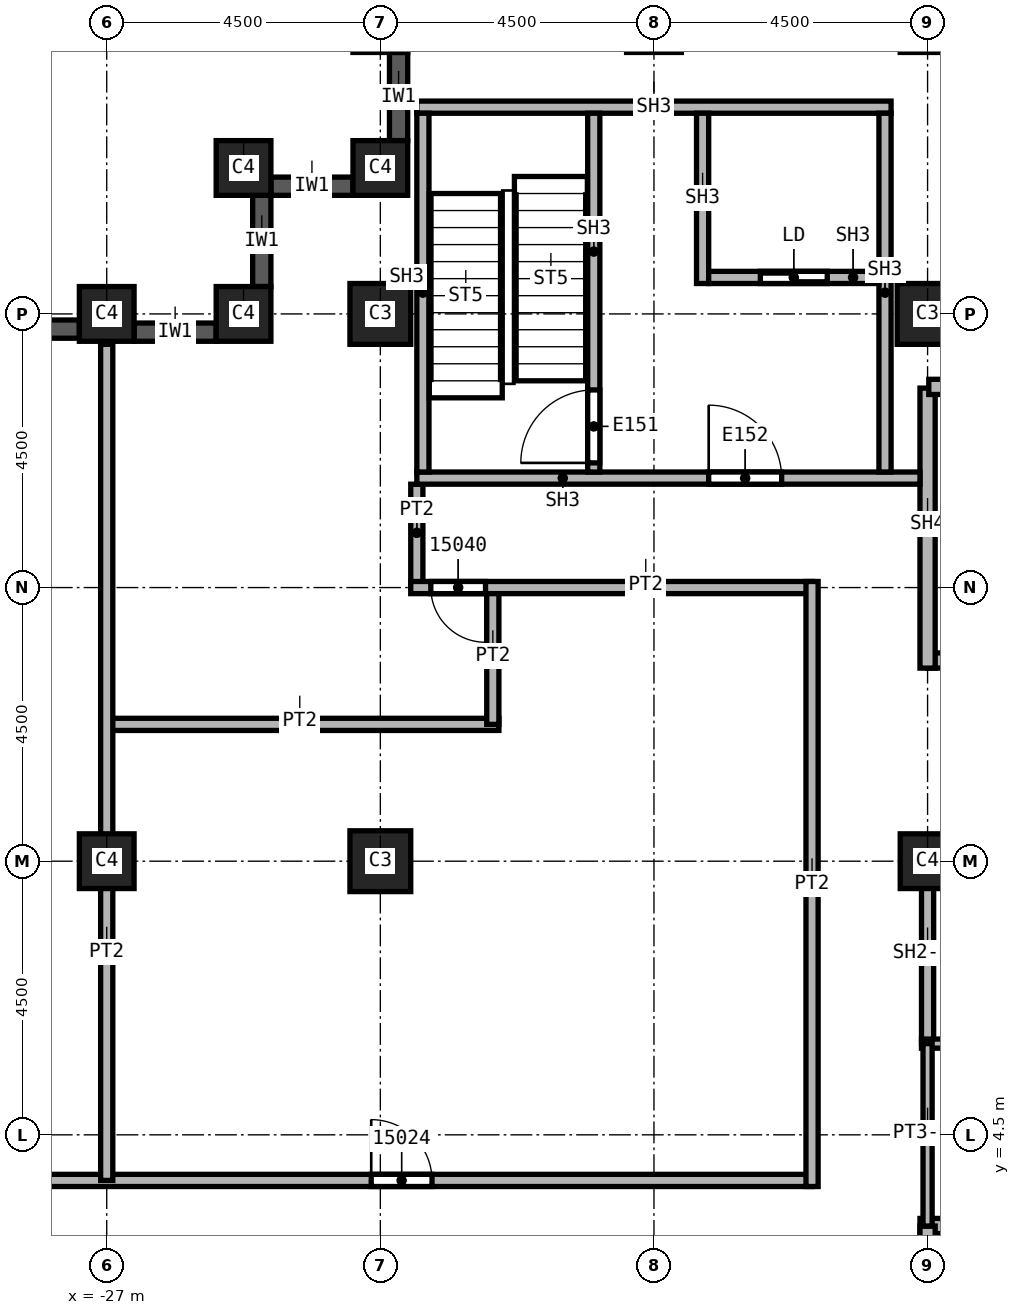
"""IFC4 building model, lengths in metres.
Left out: names, types, materials, properties, quantities, classifications, styles, units other than length and angle.
Written with IfcOpenShell. Run it as: python <this file> out.ifc"""

import sys

from ifc_helpers import new_model, si_unit, direction, frame, frame_2d, origin, origin_2d, place, context, subcontext, project, spatial, rectangle, extrude, element, fill, save


model = new_model("IFC4")
c1 = context("Model", 3, precision=1e-05, world=origin(), true_north=direction((0.0, 1.0)))
c2 = subcontext(c1, "Body", "Model", "MODEL_VIEW")
j1 = project(units=[si_unit("LENGTHUNIT", "METRE"), si_unit("PLANEANGLEUNIT", "RADIAN")], contexts=[c1])
p1 = place(None, origin())
s1 = spatial("IfcSite", under=j1, at=p1, CompositionType="ELEMENT")
p2 = place(p1, origin())
s2 = spatial("IfcBuilding", under=s1, at=p2, CompositionType="ELEMENT")
p3 = place(p2, frame((0.0, 0.0, 228.0)))
s3 = spatial("IfcBuildingStorey", under=s2, at=p3, CompositionType="ELEMENT", Elevation=228.0)
for number, where, z_axis, x_axis in (
    (1, (-13.5, 18.0, 0.0), (0.0, 0.0, 1.0), (1.0, 0.0, 0.0)),
    (2, (-22.5, 9.0, 0.0), (0.0, 0.0, 1.0), (1.0, 0.0, 0.0)),
    (3, (-22.5, 18.0, 0.0), (0.0, 0.0, 1.0), (1.0, 0.0, 0.0)),
):
    element("IfcColumn", number, at=place(p3, frame(where, z_axis=z_axis, x_axis=x_axis)), inside=s3, PredefinedType="COLUMN", context=c2, shape_type="SweptSolid", body=[
        extrude(rectangle(XDim=1.0, YDim=1.0, at=origin_2d()), origin(), (0.0, 0.0, 1.0), 3.72),
    ])
for number, where, z_axis, x_axis in (
    (4, (-13.5, 9.0, 0.0), (0.0, 0.0, 1.0), (1.0, 0.0, 0.0)),
    (5, (-27.0, 9.0, 0.0), (0.0, 0.0, 1.0), (1.0, 0.0, 0.0)),
    (6, (-27.0, 18.0, 0.0), (0.0, 0.0, 1.0), (1.0, 0.0, 0.0)),
    (7, (-22.5, 20.4, 0.0), (0.0, 0.0, 1.0), (1.0, 0.0, 0.0)),
    (8, (-24.75, 20.4, 0.0), (0.0, 0.0, 1.0), (1.0, 0.0, 0.0)),
    (9, (-24.75, 18.0, 0.0), (0.0, 0.0, 1.0), (1.0, 0.0, 0.0)),
):
    element("IfcColumn", number, at=place(p3, frame(where, z_axis=z_axis, x_axis=x_axis)), inside=s3, PredefinedType="COLUMN", context=c2, shape_type="SweptSolid", body=[
        extrude(rectangle(XDim=0.9, YDim=0.9, at=origin_2d()), origin(), (0.0, 0.0, 1.0), 3.72),
    ])
p4 = place(p3, frame((-22.95, 20.1, 0.0), z_axis=(0.0, 0.0, 1.0), x_axis=(-1.0, 0.0, 0.0)))
e10 = element("IfcWall", 10, at=p4, inside=s3, PredefinedType="SOLIDWALL", context=c2, shape_type="SweptSolid", body=[
    extrude(rectangle(XDim=1.35, YDim=0.3, at=frame_2d((0.675, 0.0))), origin(), (0.0, 0.0, 1.0), 3.12),
])
p5 = place(p3, frame((-24.45, 19.95, 0.0), z_axis=(0.0, 0.0, 1.0), x_axis=(0.0, -1.0, 0.0)))
e11 = element("IfcWall", 11, at=p5, inside=s3, PredefinedType="SOLIDWALL", context=c2, shape_type="SweptSolid", body=[
    extrude(rectangle(XDim=1.5, YDim=0.3, at=frame_2d((0.75, 0.0))), origin(), (0.0, 0.0, 1.0), 3.12),
])
p6 = place(p3, frame((-25.2, 17.7, 0.0), z_axis=(0.0, 0.0, 1.0), x_axis=(-1.0, 0.0, 0.0)))
e12 = element("IfcWall", 12, at=p6, inside=s3, PredefinedType="SOLIDWALL", context=c2, shape_type="SweptSolid", body=[
    extrude(rectangle(XDim=1.35, YDim=0.3, at=frame_2d((0.675, 0.0))), origin(), (0.0, 0.0, 1.0), 3.12),
])
p7 = place(p3, frame((-27.45, 17.75, 0.0), z_axis=(0.0, 0.0, 1.0), x_axis=(-1.0, 0.0, 0.0)))
e13 = element("IfcWall", 13, at=p7, inside=s3, PredefinedType="SOLIDWALL", context=c2, shape_type="SweptSolid", body=[
    extrude(rectangle(XDim=3.6, YDim=0.3, at=frame_2d((1.8, 0.0))), origin(), (0.0, 0.0, 1.0), 3.12),
])
p8 = place(p7, frame((0.6, 0.0, 0.8)))
e14 = element("IfcOpeningElement", 14, at=p8, cuts=e13, PredefinedType="OPENING", context=c2, shape_type="SweptSolid", body=[
    extrude(rectangle(XDim=2.4, YDim=1.95, at=frame_2d((1.2, 0.975))), frame((0.0, 0.15, 0.0), z_axis=(0.0, -1.0, 0.0), x_axis=(1.0, 0.0, 0.0)), (0.0, 0.0, 1.0), 0.3),
])
p9 = place(p3, frame((-22.2, 22.3, 0.0), z_axis=(0.0, 0.0, 1.0), x_axis=(0.0, -1.0, 0.0)))
e15 = element("IfcWall", 15, at=p9, inside=s3, PredefinedType="SOLIDWALL", context=c2, shape_type="SweptSolid", body=[
    extrude(rectangle(XDim=1.45, YDim=0.3, at=frame_2d((0.725, 0.0))), origin(), (0.0, 0.0, 1.0), 3.12),
])
p10 = place(p3, frame((-33.85, 3.75, 0.0), z_axis=(0.0, 0.0, 1.0), x_axis=(1.0, 0.0, 0.0)))
e16 = element("IfcWall", 16, at=p10, inside=s3, PredefinedType="PARTITIONING", context=c2, shape_type="SweptSolid", body=[
    extrude(rectangle(XDim=18.45, YDim=0.2, at=frame_2d((9.225, 0.0))), origin(), (0.0, 0.0, 1.0), 3.72),
])
p11 = place(p10, frame((11.2, 0.0, 0.0)))
e17 = element("IfcOpeningElement", 17, at=p11, cuts=e16, PredefinedType="OPENING", context=c2, shape_type="SweptSolid", body=[
    extrude(rectangle(XDim=1.0, YDim=2.1, at=frame_2d((0.5, 1.05))), frame((0.0, 0.1, 0.0), z_axis=(0.0, -1.0, 0.0), x_axis=(1.0, 0.0, 0.0)), (0.0, 0.0, 1.0), 0.2),
])
p12 = place(p3, frame((-27.1, 11.25, 0.0), z_axis=(0.0, 0.0, 1.0), x_axis=(1.0, 0.0, 0.0)))
e18 = element("IfcWall", 18, at=p12, inside=s3, PredefinedType="PARTITIONING", context=c2, shape_type="SweptSolid", body=[
    extrude(rectangle(XDim=6.55, YDim=0.2, at=frame_2d((3.275, 0.0))), origin(), (0.0, 0.0, 1.0), 3.72),
])
p13 = place(p3, frame((-27.0, 3.75, 0.0), z_axis=(0.0, 0.0, 1.0), x_axis=(0.0, 1.0, 0.0)))
e19 = element("IfcWall", 19, at=p13, inside=s3, PredefinedType="PARTITIONING", context=c2, shape_type="SweptSolid", body=[
    extrude(rectangle(XDim=13.75, YDim=0.2, at=frame_2d((6.875, 0.0))), origin(), (0.0, 0.0, 1.0), 3.72),
])
p14 = place(p3, frame((-21.9, 13.5, 0.0), z_axis=(0.0, 0.0, 1.0), x_axis=(0.0, 1.0, 0.0)))
e20 = element("IfcWall", 20, at=p14, inside=s3, PredefinedType="PARTITIONING", context=c2, shape_type="SweptSolid", body=[
    extrude(rectangle(XDim=1.7, YDim=0.2, at=frame_2d((0.85, 0.0))), origin(), (0.0, 0.0, 1.0), 3.72),
])
p15 = place(p3, frame((-20.65, 11.25, 0.0), z_axis=(0.0, 0.0, 1.0), x_axis=(0.0, 1.0, 0.0)))
e21 = element("IfcWall", 21, at=p15, inside=s3, PredefinedType="PARTITIONING", context=c2, shape_type="SweptSolid", body=[
    extrude(rectangle(XDim=2.25, YDim=0.2, at=frame_2d((1.125, 0.0))), origin(), (0.0, 0.0, 1.0), 3.72),
])
p16 = place(p3, frame((-15.4, 13.5, 0.0), z_axis=(0.0, 0.0, 1.0), x_axis=(-1.0, 0.0, 0.0)))
e22 = element("IfcWall", 22, at=p16, inside=s3, PredefinedType="PARTITIONING", context=c2, shape_type="SweptSolid", body=[
    extrude(rectangle(XDim=6.6, YDim=0.2, at=frame_2d((3.3, 0.0))), origin(), (0.0, 0.0, 1.0), 3.72),
])
p17 = place(p16, frame((5.37, 0.0, 0.0)))
e23 = element("IfcOpeningElement", 23, at=p17, cuts=e22, PredefinedType="OPENING", context=c2, shape_type="SweptSolid", body=[
    extrude(rectangle(XDim=0.9, YDim=2.1, at=frame_2d((0.45, 1.05))), frame((0.0, 0.1, 0.0), z_axis=(0.0, -1.0, 0.0), x_axis=(1.0, 0.0, 0.0)), (0.0, 0.0, 1.0), 0.2),
])
p18 = place(p3, frame((-15.4, 3.65, 0.0), z_axis=(0.0, 0.0, 1.0), x_axis=(0.0, 1.0, 0.0)))
e24 = element("IfcWall", 24, at=p18, inside=s3, PredefinedType="PARTITIONING", context=c2, shape_type="SweptSolid", body=[
    extrude(rectangle(XDim=9.95, YDim=0.2, at=frame_2d((4.975, 0.0))), origin(), (0.0, 0.0, 1.0), 3.72),
])
p19 = place(p3, frame((-13.5, 6.0, 0.0), z_axis=(0.0, 0.0, 1.0), x_axis=(0.0, 1.0, 0.0)))
e25 = element("IfcWall", 25, at=p19, inside=s3, PredefinedType="SOLIDWALL", context=c2, shape_type="SweptSolid", body=[
    extrude(rectangle(XDim=3.1, YDim=0.2, at=frame_2d((1.55, 0.0))), origin(), (0.0, 0.0, 1.0), 2.958),
])
p20 = place(p3, frame((-13.5, 9.0, 0.0), z_axis=(0.0, 0.0, 1.0), x_axis=(1.0, 0.0, 0.0)))
e26 = element("IfcWall", 26, at=p20, inside=s3, PredefinedType="SOLIDWALL", context=c2, shape_type="SweptSolid", body=[
    extrude(rectangle(XDim=3.0, YDim=0.2, at=frame_2d((1.5, 0.0))), origin(), (0.0, 0.0, 1.0), 2.958),
])
p21 = place(p3, frame((-13.625, 3.0, 0.0), z_axis=(0.0, 0.0, 1.0), x_axis=(1.0, 0.0, 0.0)))
e27 = element("IfcWall", 27, at=p21, inside=s3, PredefinedType="SOLIDWALL", context=c2, shape_type="SweptSolid", body=[
    extrude(rectangle(XDim=9.25, YDim=0.25, at=frame_2d((4.625, 0.0))), origin(), (0.0, 0.0, 1.0), 3.72),
])
p22 = place(p21, frame((3.25, 0.0, 0.0)))
e28 = element("IfcOpeningElement", 28, at=p22, cuts=e27, PredefinedType="OPENING", context=c2, shape_type="SweptSolid", body=[
    extrude(rectangle(XDim=1.1, YDim=2.1, at=frame_2d((0.55, 1.05))), frame((0.0, 0.125, 0.0), z_axis=(0.0, -1.0, 0.0), x_axis=(1.0, 0.0, 0.0)), (0.0, 0.0, 1.0), 0.25),
])
p23 = place(p3, frame((-13.5, -3.0, 0.0), z_axis=(0.0, 0.0, 1.0), x_axis=(0.0, 1.0, 0.0)))
e29 = element("IfcWall", 29, at=p23, inside=s3, PredefinedType="SOLIDWALL", context=c2, shape_type="SweptSolid", body=[
    extrude(rectangle(XDim=6.0, YDim=0.25, at=frame_2d((3.0, 0.0))), origin(), (0.0, 0.0, 1.0), 2.958),
])
p24 = place(p3, frame((-13.5, 12.3, 0.0), z_axis=(0.0, 0.0, 1.0), x_axis=(1.0, 0.0, 0.0)))
e30 = element("IfcWall", 30, at=p24, inside=s3, PredefinedType="SOLIDWALL", context=c2, shape_type="SweptSolid", body=[
    extrude(rectangle(XDim=9.125, YDim=0.25, at=frame_2d((4.562, 0.0))), origin(), (0.0, 0.0, 1.0), 3.72),
])
p25 = place(p24, frame((0.6, 0.0, 0.0)))
e31 = element("IfcOpeningElement", 31, at=p25, cuts=e30, PredefinedType="OPENING", context=c2, shape_type="SweptSolid", body=[
    extrude(rectangle(XDim=1.2, YDim=2.1, at=frame_2d((0.6, 1.05))), frame((0.0, 0.125, 0.0), z_axis=(0.0, -1.0, 0.0), x_axis=(1.0, 0.0, 0.0)), (0.0, 0.0, 1.0), 0.25),
])
p26 = place(p3, frame((-13.5, 16.78, 0.0), z_axis=(0.0, 0.0, 1.0), x_axis=(0.0, -1.0, 0.0)))
e32 = element("IfcWall", 32, at=p26, inside=s3, PredefinedType="SOLIDWALL", context=c2, shape_type="SweptSolid", body=[
    extrude(rectangle(XDim=4.605, YDim=0.25, at=frame_2d((2.302, 0.0))), origin(), (0.0, 0.0, 1.0), 3.72),
])
p27 = place(p3, frame((-13.48, 16.8, 0.0), z_axis=(0.0, 0.0, 1.0), x_axis=(1.0, 0.0, 0.0)))
e33 = element("IfcWall", 33, at=p27, inside=s3, PredefinedType="SOLIDWALL", context=c2, shape_type="SweptSolid", body=[
    extrude(rectangle(XDim=8.96, YDim=0.25, at=frame_2d((4.48, 0.0))), origin(), (0.0, 0.0, 1.0), 3.72),
])
p28 = place(p3, frame((-13.6, 6.0, 0.0), z_axis=(0.0, 0.0, 1.0), x_axis=(1.0, 0.0, 0.0)))
e34 = element("IfcWall", 34, at=p28, inside=s3, PredefinedType="PARTITIONING", context=c2, shape_type="SweptSolid", body=[
    extrude(rectangle(XDim=3.1, YDim=0.15, at=frame_2d((1.55, 0.0))), origin(), (0.0, 0.0, 1.0), 3.72),
])
p29 = place(p3, frame((-13.5, 3.0, 0.0), z_axis=(0.0, 0.0, 1.0), x_axis=(0.0, 1.0, 0.0)))
e35 = element("IfcWall", 35, at=p29, inside=s3, PredefinedType="PARTITIONING", context=c2, shape_type="SweptSolid", body=[
    extrude(rectangle(XDim=3.0, YDim=0.15, at=frame_2d((1.5, 0.0))), origin(), (0.0, 0.0, 1.0), 2.958),
])
p30 = place(p3, frame((-21.9, 15.3, 0.0), z_axis=(0.0, 0.0, 1.0), x_axis=(1.0, 0.0, 0.0)))
e36 = element("IfcWall", 36, at=p30, inside=s3, PredefinedType="SOLIDWALL", context=c2, shape_type="SweptSolid", body=[
    extrude(rectangle(XDim=8.275, YDim=0.2, at=frame_2d((4.137, 0.0))), origin(), (0.0, 0.0, 1.0), 3.72),
])
p31 = place(p30, frame((4.8, 0.0, 0.0)))
e37 = element("IfcOpeningElement", 37, at=p31, cuts=e36, PredefinedType="OPENING", context=c2, shape_type="SweptSolid", body=[
    extrude(rectangle(XDim=1.2, YDim=2.1, at=frame_2d((0.6, 1.05))), frame((0.0, 0.1, 0.0), z_axis=(0.0, -1.0, 0.0), x_axis=(1.0, 0.0, 0.0)), (0.0, 0.0, 1.0), 0.2),
])
p32 = place(p3, frame((-21.9, 21.4, 0.0), z_axis=(0.0, 0.0, 1.0), x_axis=(1.0, 0.0, 0.0)))
e38 = element("IfcWall", 38, at=p32, inside=s3, PredefinedType="SOLIDWALL", context=c2, shape_type="SweptSolid", body=[
    extrude(rectangle(XDim=7.8, YDim=0.2, at=frame_2d((3.9, 0.0))), origin(), (0.0, 0.0, 1.0), 3.72),
])
for number, where, z_axis, x_axis in (
    (39, (-21.8, 15.4, 0.0), (0.0, 0.0, 1.0), (0.0, 1.0, 0.0)),
    (40, (-14.2, 15.4, 0.0), (0.0, 0.0, 1.0), (0.0, 1.0, 0.0)),
):
    element("IfcWall", number, at=place(p3, frame(where, z_axis=z_axis, x_axis=x_axis)), inside=s3, PredefinedType="SOLIDWALL", context=c2, shape_type="SweptSolid", body=[
        extrude(rectangle(XDim=5.9, YDim=0.2, at=frame_2d((2.95, 0.0))), origin(), (0.0, 0.0, 1.0), 3.72),
    ])
p33 = place(p3, frame((-18.99, 15.4, 0.0), z_axis=(0.0, 0.0, 1.0), x_axis=(0.0, 1.0, 0.0)))
e41 = element("IfcWall", 41, at=p33, inside=s3, PredefinedType="SOLIDWALL", context=c2, shape_type="SweptSolid", body=[
    extrude(rectangle(XDim=5.9, YDim=0.2, at=frame_2d((2.95, 0.0))), origin(), (0.0, 0.0, 1.0), 3.72),
])
p34 = place(p33, frame((0.15, 0.0, 0.0)))
e42 = element("IfcOpeningElement", 42, at=p34, cuts=e41, PredefinedType="OPENING", context=c2, shape_type="SweptSolid", body=[
    extrude(rectangle(XDim=1.2, YDim=2.1, at=frame_2d((0.6, 1.05))), frame((0.0, 0.1, 0.0), z_axis=(0.0, -1.0, 0.0), x_axis=(1.0, 0.0, 0.0)), (0.0, 0.0, 1.0), 0.2),
])
p35 = place(p3, frame((-17.2, 18.5, 0.0), z_axis=(0.0, 0.0, 1.0), x_axis=(0.0, 1.0, 0.0)))
e43 = element("IfcWall", 43, at=p35, inside=s3, PredefinedType="SOLIDWALL", context=c2, shape_type="SweptSolid", body=[
    extrude(rectangle(XDim=2.8, YDim=0.2, at=frame_2d((1.4, 0.0))), origin(), (0.0, 0.0, 1.0), 3.72),
])
p36 = place(p3, frame((-17.1, 18.6, 0.0), z_axis=(0.0, 0.0, 1.0), x_axis=(1.0, 0.0, 0.0)))
e44 = element("IfcWall", 44, at=p36, inside=s3, PredefinedType="SOLIDWALL", context=c2, shape_type="SweptSolid", body=[
    extrude(rectangle(XDim=2.8, YDim=0.2, at=frame_2d((1.4, 0.0))), origin(), (0.0, 0.0, 1.0), 3.72),
])
p37 = place(p36, frame((0.85, 0.0, 0.0)))
e45 = element("IfcOpeningElement", 45, at=p37, cuts=e44, PredefinedType="OPENING", context=c2, shape_type="SweptSolid", body=[
    extrude(rectangle(XDim=1.1, YDim=2.1, at=frame_2d((0.55, 1.05))), frame((0.0, 0.1, 0.0), z_axis=(0.0, -1.0, 0.0), x_axis=(1.0, 0.0, 0.0)), (0.0, 0.0, 1.0), 0.2),
])
p38 = place(p11, origin())
e46 = element("IfcDoor", 46, at=p38, inside=s3, OperationType="SINGLE_SWING_LEFT", PredefinedType="DOOR", context=c2, shape_type="SweptSolid", body=[
    extrude(rectangle(XDim=1.0, YDim=2.1, at=frame_2d((0.5, 1.05))), frame((0.0, 0.025, 0.0), z_axis=(0.0, -1.0, 0.0), x_axis=(1.0, 0.0, 0.0)), (0.0, 0.0, 1.0), 0.05),
])
fill(e17, e46)
p39 = place(p17, origin())
e47 = element("IfcDoor", 47, at=p39, inside=s3, OperationType="SINGLE_SWING_LEFT", PredefinedType="DOOR", context=c2, shape_type="SweptSolid", body=[
    extrude(rectangle(XDim=0.9, YDim=2.1, at=frame_2d((0.45, 1.05))), frame((0.0, 0.025, 0.0), z_axis=(0.0, -1.0, 0.0), x_axis=(1.0, 0.0, 0.0)), (0.0, 0.0, 1.0), 0.05),
])
fill(e23, e47)
p40 = place(p34, origin())
e48 = element("IfcDoor", 48, at=p40, inside=s3, OperationType="SINGLE_SWING_LEFT", PredefinedType="DOOR", context=c2, shape_type="SweptSolid", body=[
    extrude(rectangle(XDim=1.2, YDim=2.1, at=frame_2d((0.6, 1.05))), frame((0.0, 0.025, 0.0), z_axis=(0.0, -1.0, 0.0), x_axis=(1.0, 0.0, 0.0)), (0.0, 0.0, 1.0), 0.05),
])
fill(e42, e48)
p41 = place(p37, origin())
e49 = element("IfcDoor", 49, at=p41, inside=s3, OperationType="SLIDING_TO_LEFT", PredefinedType="DOOR", context=c2, shape_type="SweptSolid", body=[
    extrude(rectangle(XDim=1.1, YDim=2.1, at=frame_2d((0.55, 1.05))), frame((0.0, 0.025, 0.0), z_axis=(0.0, -1.0, 0.0), x_axis=(1.0, 0.0, 0.0)), (0.0, 0.0, 1.0), 0.05),
])
fill(e45, e49)
p42 = place(p31, origin())
e50 = element("IfcDoor", 50, at=p42, inside=s3, OperationType="SINGLE_SWING_RIGHT", PredefinedType="DOOR", context=c2, shape_type="SweptSolid", body=[
    extrude(rectangle(XDim=1.2, YDim=2.1, at=frame_2d((0.6, 1.05))), frame((0.0, 0.025, 0.0), z_axis=(0.0, -1.0, 0.0), x_axis=(1.0, 0.0, 0.0)), (0.0, 0.0, 1.0), 0.05),
])
fill(e37, e50)
save(model, sys.argv[1])
